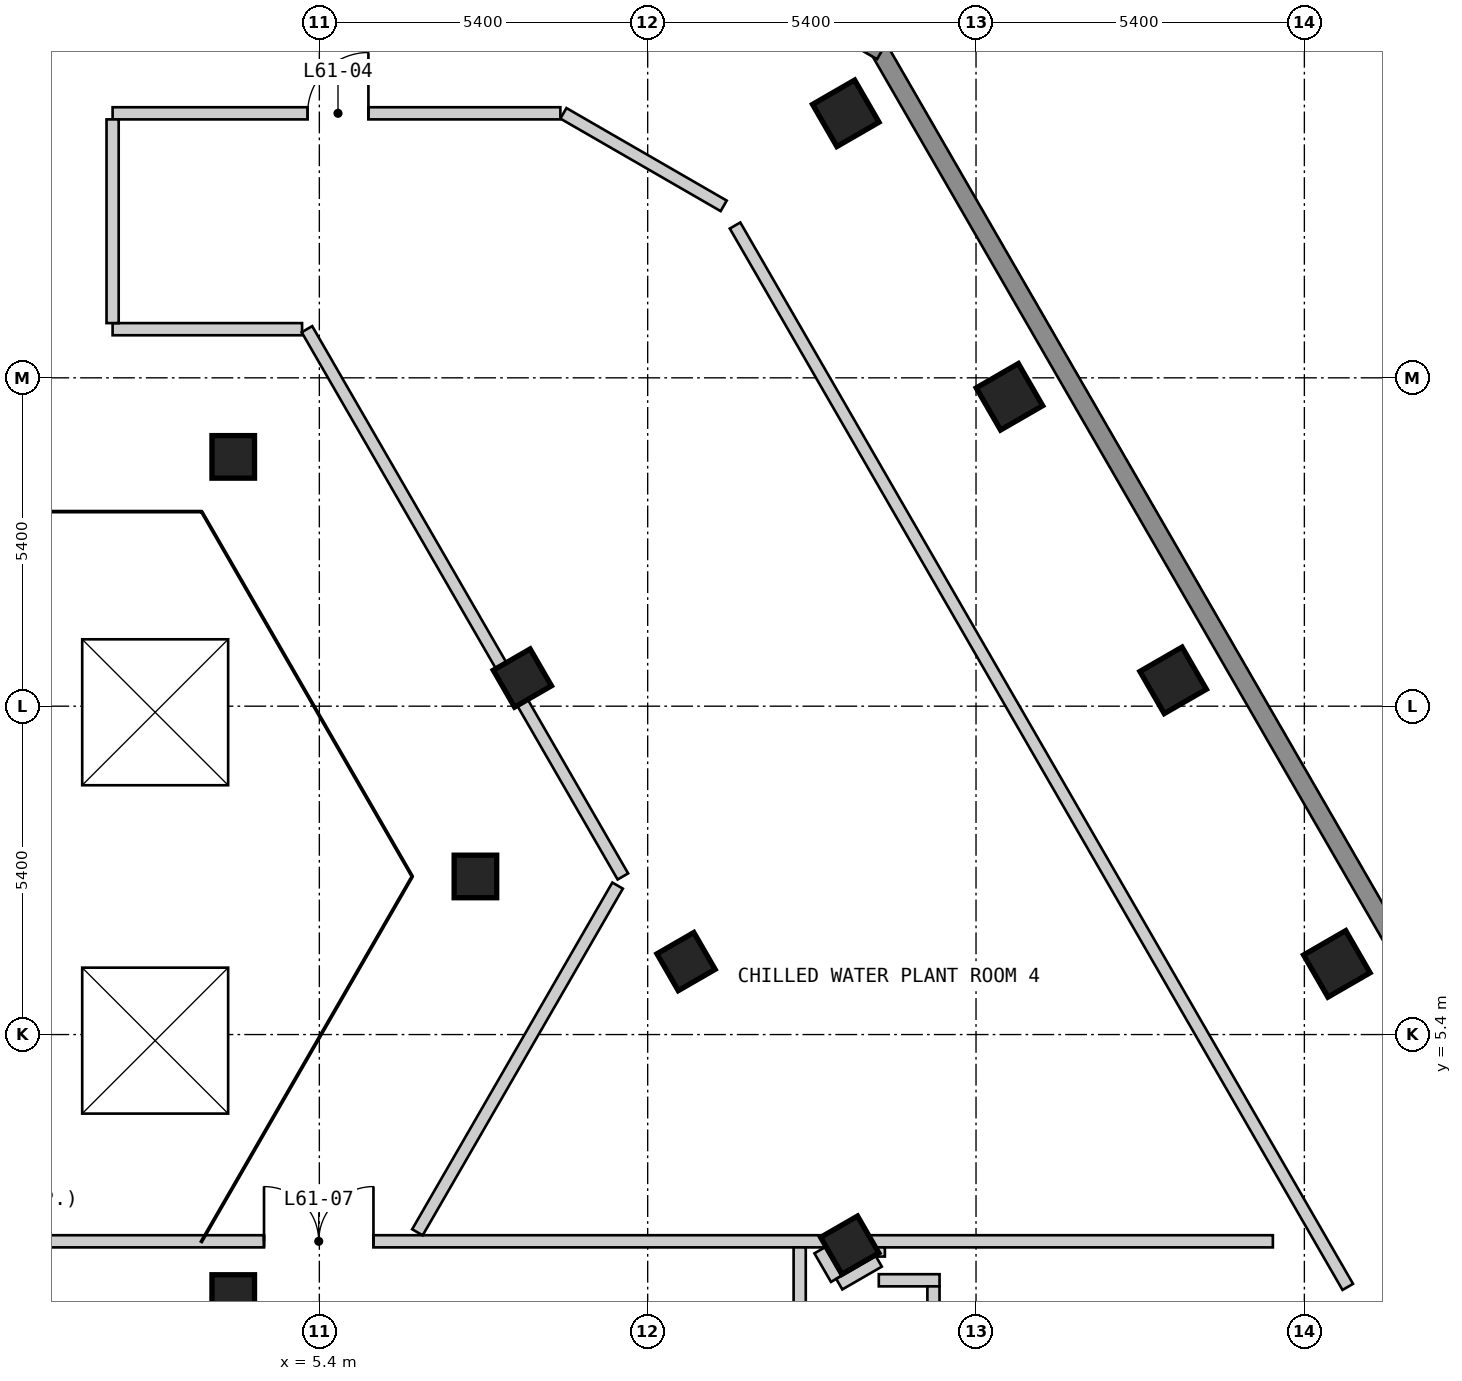
"""IFC4 building model, lengths in metres.
Left out: names, types, materials, properties, quantities, classifications, styles, units other than length and angle.
Written with IfcOpenShell. Run it as: python <this file> out.ifc"""

import sys

from ifc_helpers import new_model, si_unit, direction, frame, frame_2d, origin, origin_2d, place, context, subcontext, project, spatial, polyline, rectangle, outline, extrude, element, fill, save


model = new_model("IFC4")
c1 = context("Model", 3, precision=1e-05, world=origin(), true_north=direction((0.0, 1.0)))
c2 = subcontext(c1, "Body", "Model", "MODEL_VIEW")
j1 = project(units=[si_unit("LENGTHUNIT", "METRE"), si_unit("PLANEANGLEUNIT", "RADIAN")], contexts=[c1])
p1 = place(None, origin())
s1 = spatial("IfcSite", under=j1, at=p1, CompositionType="ELEMENT")
p2 = place(p1, origin())
s2 = spatial("IfcBuilding", under=s1, at=p2, CompositionType="ELEMENT")
p3 = place(p2, frame((0.0, 0.0, 199.2)))
s3 = spatial("IfcBuildingStorey", under=s2, at=p3, CompositionType="ELEMENT", Elevation=199.2)
for number, where, z_axis, x_axis in (
    (1, (22.134, 6.562, 0.0), (0.0, 0.0, 1.0), (-0.5, 0.866, 0.0)),
    (2, (19.442, 11.225, 0.0), (0.0, 0.0, 1.0), (-0.5, 0.866, 0.0)),
    (3, (16.75, 15.888, 0.0), (0.0, 0.0, 1.0), (-0.5, 0.866, 0.0)),
    (4, (14.058, 20.55, 0.0), (0.0, 0.0, 1.0), (-0.5, 0.866, 0.0)),
):
    element("IfcColumn", number, at=place(p3, frame(where, z_axis=z_axis, x_axis=x_axis)), inside=s3, PredefinedType="COLUMN", context=c2, shape_type="SweptSolid", body=[
        extrude(rectangle(XDim=0.8, YDim=0.8, at=origin_2d()), origin(), (0.0, 0.0, 1.0), 3.6),
    ])
for number, where, z_axis, x_axis in (
    (5, (14.123, 1.937, 0.0), (0.0, 0.0, 1.0), (-0.5, 0.866, 0.0)),
    (6, (3.984, 1.1, 0.0), (0.0, 0.0, 1.0), (1.0, 0.0, 0.0)),
    (7, (11.431, 6.6, 0.0), (0.0, 0.0, 1.0), (-0.5, 0.866, 0.0)),
    (8, (7.967, 8.0, 0.0), (0.0, 0.0, 1.0), (1.0, 0.0, 0.0)),
    (9, (8.739, 11.263, 0.0), (0.0, 0.0, 1.0), (-0.5, 0.866, 0.0)),
    (10, (3.984, 14.9, 0.0), (0.0, 0.0, 1.0), (1.0, 0.0, 0.0)),
):
    element("IfcColumn", number, at=place(p3, frame(where, z_axis=z_axis, x_axis=x_axis)), inside=s3, PredefinedType="COLUMN", context=c2, shape_type="SweptSolid", body=[
        extrude(rectangle(XDim=0.7, YDim=0.7, at=origin_2d()), origin(), (0.0, 0.0, 1.0), 3.6),
    ])
p4 = place(p3, frame((26.024, 1.825, 0.0), z_axis=(0.0, 0.0, 1.0), x_axis=(-0.500010537973, 0.866019319597, 0.0)))
e11 = element("IfcWall", 11, at=p4, inside=s3, PredefinedType="SOLIDWALL", context=c2, shape_type="SweptSolid", body=[
    extrude(outline(polyline([(0.0, -0.15), (22.863, -0.15), (22.783, 0.15), (0.08, 0.15), (0.0, -0.15)])), origin(), (0.0, 0.0, 1.0), 2.6),
])
p5 = place(p3, frame((14.647, 21.57, 0.0), z_axis=(0.0, 0.0, 1.0), x_axis=(-0.866022959057, 0.500004234368, 0.0)))
e12 = element("IfcWall", 12, at=p5, inside=s3, PredefinedType="SOLIDWALL", context=c2, shape_type="SweptSolid", body=[
    extrude(outline(polyline([(0.0, -0.15), (5.0, -0.15), (4.92, 0.15), (0.08, 0.15), (0.0, -0.15)])), origin(), (0.0, 0.0, 1.0), 2.6),
])
p6 = place(p3, frame((14.601, 1.359, 0.0), z_axis=(0.0, 0.0, 1.0), x_axis=(1.0, 0.0, 0.0)))
e13 = element("IfcWall", 13, at=p6, inside=s3, PredefinedType="SOLIDWALL", context=c2, shape_type="SweptSolid", body=[
    extrude(rectangle(XDim=0.999, YDim=0.2, at=frame_2d((0.5, 0.0))), origin(), (0.0, 0.0, 1.0), 2.6),
])
p7 = place(p3, frame((-21.482, 2.0, 0.0), z_axis=(0.0, 0.0, 1.0), x_axis=(1.0, 0.0, 0.0)))
e14 = element("IfcWall", 14, at=p7, inside=s3, PredefinedType="SOLIDWALL", context=c2, shape_type="SweptSolid", body=[
    extrude(rectangle(XDim=42.564, YDim=0.2, at=frame_2d((21.282, 0.0))), origin(), (0.0, 0.0, 1.0), 2.6),
])
p8 = place(p7, frame((4.432, 0.0, 0.0)))
e15 = element("IfcOpeningElement", 15, at=p8, cuts=e14, PredefinedType="OPENING", context=c2, shape_type="SweptSolid", body=[
    extrude(rectangle(XDim=1.0, YDim=2.1, at=frame_2d((0.5, 1.05))), frame((0.0, 0.11, 0.0), z_axis=(0.0, -1.0, 0.0), x_axis=(1.0, 0.0, 0.0)), (0.0, 0.0, 1.0), 0.22),
])
p9 = place(p7, frame((25.972, 0.0, 0.0)))
e16 = element("IfcOpeningElement", 16, at=p9, cuts=e14, PredefinedType="OPENING", context=c2, shape_type="SweptSolid", body=[
    extrude(rectangle(XDim=1.8, YDim=2.1, at=frame_2d((0.9, 1.05))), frame((0.0, 0.11, 0.0), z_axis=(0.0, -1.0, 0.0), x_axis=(1.0, 0.0, 0.0)), (0.0, 0.0, 1.0), 0.22),
])
p10 = place(p3, frame((2.0, 17.0, 0.0), z_axis=(0.0, 0.0, 1.0), x_axis=(1.0, 0.0, 0.0)))
e17 = element("IfcWall", 17, at=p10, inside=s3, PredefinedType="SOLIDWALL", context=c2, shape_type="SweptSolid", body=[
    extrude(rectangle(XDim=3.116, YDim=0.2, at=frame_2d((1.558, 0.0))), origin(), (0.0, 0.0, 1.0), 2.6),
])
p11 = place(p3, frame((2.0, 20.55, 0.0), z_axis=(0.0, 0.0, 1.0), x_axis=(1.0, 0.0, 0.0)))
e18 = element("IfcWall", 18, at=p11, inside=s3, PredefinedType="SOLIDWALL", context=c2, shape_type="SweptSolid", body=[
    extrude(rectangle(XDim=7.364, YDim=0.2, at=frame_2d((3.682, 0.0))), origin(), (0.0, 0.0, 1.0), 2.6),
])
p12 = place(p11, frame((4.207, 0.0, 0.0), z_axis=(0.0, 0.0, 1.0), x_axis=(-1.0, 0.0, 0.0)))
e19 = element("IfcOpeningElement", 19, at=p12, cuts=e18, PredefinedType="OPENING", context=c2, shape_type="SweptSolid", body=[
    extrude(rectangle(XDim=1.0, YDim=2.1, at=frame_2d((0.5, 1.05))), frame((0.0, 0.11, 0.0), z_axis=(0.0, -1.0, 0.0), x_axis=(1.0, 0.0, 0.0)), (0.0, 0.0, 1.0), 0.22),
])
p13 = place(p3, frame((2.0, 17.1, 0.0), z_axis=(0.0, 0.0, 1.0), x_axis=(0.0, 1.0, 0.0)))
e20 = element("IfcWall", 20, at=p13, inside=s3, PredefinedType="SOLIDWALL", context=c2, shape_type="SweptSolid", body=[
    extrude(rectangle(XDim=3.35, YDim=0.2, at=frame_2d((1.675, 0.0))), origin(), (0.0, 0.0, 1.0), 2.6),
])
p14 = place(p3, frame((13.3, -4.88, 0.0), z_axis=(0.0, 0.0, 1.0), x_axis=(0.0, 1.0, 0.0)))
e21 = element("IfcWall", 21, at=p14, inside=s3, PredefinedType="PARTITIONING", context=c2, shape_type="SweptSolid", body=[
    extrude(rectangle(XDim=6.78, YDim=0.2, at=frame_2d((3.39, 0.0))), origin(), (0.0, 0.0, 1.0), 2.6),
])
p15 = place(p3, frame((14.601, 1.749, 0.0), z_axis=(0.0, 0.0, 1.0), x_axis=(0.0, 1.0, 0.0)))
e22 = element("IfcWall", 22, at=p15, inside=s3, PredefinedType="SOLIDWALL", context=c2, shape_type="SweptSolid", body=[
    extrude(rectangle(XDim=0.151, YDim=0.2, at=frame_2d((0.075, 0.0))), origin(), (0.0, 0.0, 1.0), 2.6),
])
p16 = place(p3, frame((15.5, -2.011, 0.0), z_axis=(0.0, 0.0, 1.0), x_axis=(0.0, 1.0, 0.0)))
e23 = element("IfcWall", 23, at=p16, inside=s3, PredefinedType="SOLIDWALL", context=c2, shape_type="SweptSolid", body=[
    extrude(rectangle(XDim=3.27, YDim=0.2, at=frame_2d((1.635, 0.0))), origin(), (0.0, 0.0, 1.0), 2.6),
])
p17 = place(p3, frame((9.414, 20.55, 0.0), z_axis=(0.0, 0.0, 1.0), x_axis=(0.866013277291, -0.500021003115, 0.0)))
e24 = element("IfcWall", 24, at=p17, inside=s3, PredefinedType="SOLIDWALL", context=c2, shape_type="SweptSolid", body=[
    extrude(rectangle(XDim=3.044, YDim=0.2, at=frame_2d((1.522, 0.0))), origin(), (0.0, 0.0, 1.0), 2.6),
])
p18 = place(p3, frame((13.629, 1.852, 0.0), z_axis=(0.0, 0.0, 1.0), x_axis=(0.500876749519, -0.86551862013, 0.0)))
e25 = element("IfcWall", 25, at=p18, inside=s3, PredefinedType="SOLIDWALL", context=c2, shape_type="SweptSolid", body=[
    extrude(rectangle(XDim=0.543, YDim=0.2, at=frame_2d((0.271, 0.0))), origin(), (0.0, 0.0, 1.0), 2.6),
])
p19 = place(p3, frame((5.196, 17.0, 0.0), z_axis=(0.0, 0.0, 1.0), x_axis=(0.499992241736, -0.866029882974, 0.0)))
e26 = element("IfcWall", 26, at=p19, inside=s3, PredefinedType="SOLIDWALL", context=c2, shape_type="SweptSolid", body=[
    extrude(rectangle(XDim=10.392, YDim=0.2, at=frame_2d((5.196, 0.0))), origin(), (0.0, 0.0, 1.0), 2.6),
])
p20 = place(p3, frame((12.237, 18.705, 0.0), z_axis=(0.0, 0.0, 1.0), x_axis=(0.499970611561, -0.866042370543, 0.0)))
e27 = element("IfcWall", 27, at=p20, inside=s3, PredefinedType="SOLIDWALL", context=c2, shape_type="SweptSolid", body=[
    extrude(rectangle(XDim=20.155, YDim=0.2, at=frame_2d((10.078, 0.0))), origin(), (0.0, 0.0, 1.0), 2.6),
])
p21 = place(p3, frame((13.951, 1.295, 0.0), z_axis=(0.0, 0.0, 1.0), x_axis=(0.866234320545, 0.499637970844, 0.0)))
e28 = element("IfcWall", 28, at=p21, inside=s3, PredefinedType="SOLIDWALL", context=c2, shape_type="SweptSolid", body=[
    extrude(rectangle(XDim=0.75, YDim=0.2, at=frame_2d((0.375, 0.0))), origin(), (0.0, 0.0, 1.0), 2.6),
])
p22 = place(p3, frame((7.013, 2.148, 0.0), z_axis=(0.0, 0.0, 1.0), x_axis=(0.499983511822, 0.866034923029, 0.0)))
e29 = element("IfcWall", 29, at=p22, inside=s3, PredefinedType="SOLIDWALL", context=c2, shape_type="SweptSolid", body=[
    extrude(rectangle(XDim=6.584, YDim=0.2, at=frame_2d((3.292, 0.0))), origin(), (0.0, 0.0, 1.0), 2.6),
])
p23 = place(p3, frame((0.0, 0.0, -0.4)))
p24 = place(p23, frame((2.7, 5.3, 0.0)))
p25 = place(p24, frame((0.0, 0.0, 0.35)))
e30 = element("IfcWindow", 30, at=p25, inside=s3, PartitioningType="SINGLE_PANEL", PredefinedType="SKYLIGHT", context=c2, shape_type="SweptSolid", body=[
    extrude(rectangle(XDim=2.4, YDim=2.4, at=origin_2d()), origin(), (0.0, 0.0, 1.0), 0.05),
])
p26 = place(p23, frame((2.7, 10.7, 0.0)))
p27 = place(p26, frame((0.0, 0.0, 0.35)))
e31 = element("IfcWindow", 31, at=p27, inside=s3, PartitioningType="SINGLE_PANEL", PredefinedType="SKYLIGHT", context=c2, shape_type="SweptSolid", body=[
    extrude(rectangle(XDim=2.4, YDim=2.4, at=origin_2d()), origin(), (0.0, 0.0, 1.0), 0.05),
])
p28 = place(p12, origin())
e32 = element("IfcDoor", 32, at=p28, inside=s3, OperationType="SINGLE_SWING_LEFT", PredefinedType="DOOR", context=c2, shape_type="SweptSolid", body=[
    extrude(rectangle(XDim=1.0, YDim=2.1, at=frame_2d((0.5, 1.05))), frame((0.0, 0.025, 0.0), z_axis=(0.0, -1.0, 0.0), x_axis=(1.0, 0.0, 0.0)), (0.0, 0.0, 1.0), 0.05),
])
fill(e19, e32)
p29 = place(p9, origin())
e33 = element("IfcDoor", 33, at=p29, inside=s3, OperationType="DOUBLE_DOOR_SINGLE_SWING", PredefinedType="DOOR", context=c2, shape_type="SweptSolid", body=[
    extrude(rectangle(XDim=1.8, YDim=2.1, at=frame_2d((0.9, 1.05))), frame((0.0, 0.025, 0.0), z_axis=(0.0, -1.0, 0.0), x_axis=(1.0, 0.0, 0.0)), (0.0, 0.0, 1.0), 0.05),
])
fill(e16, e33)
save(model, sys.argv[1])
